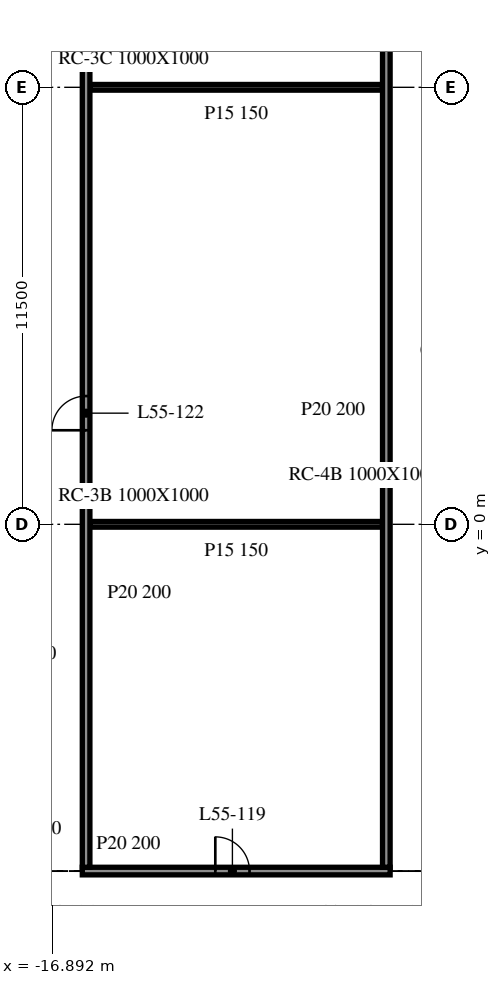
"""IFC4 building model, lengths in metres.
Left out: names, types, materials, properties, quantities, classifications, styles, units other than length and angle.
Written with IfcOpenShell. Run it as: python <this file> out.ifc"""

import sys

from ifc_helpers import new_model, si_unit, direction, frame, frame_2d, origin, place, context, subcontext, project, spatial, rectangle, extrude, element, fill, save


model = new_model("IFC4")
c1 = context("Model", 3, precision=1e-05, world=origin(), true_north=direction((0.0, 1.0)))
c2 = subcontext(c1, "Body", "Model", "MODEL_VIEW")
j1 = project(units=[si_unit("LENGTHUNIT", "METRE"), si_unit("PLANEANGLEUNIT", "RADIAN")], contexts=[c1])
p1 = place(None, origin())
s1 = spatial("IfcSite", under=j1, at=p1, CompositionType="ELEMENT")
p2 = place(p1, origin())
s2 = spatial("IfcBuilding", under=s1, at=p2, CompositionType="ELEMENT")
p3 = place(p2, frame((0.0, 0.0, 228.6)))
s3 = spatial("IfcBuildingStorey", under=s2, at=p3, CompositionType="ELEMENT", Elevation=228.6)
p4 = place(p3, frame((-16.1, -9.125, 0.0), z_axis=(0.0, 0.0, 1.0), x_axis=(1.0, 0.0, 0.0)))
e1 = element("IfcWall", 1, at=p4, inside=s3, PredefinedType="PARTITIONING", context=c2, shape_type="SweptSolid", body=[
    extrude(rectangle(XDim=8.1, YDim=0.2, at=frame_2d((4.05, 0.0))), origin(), (0.0, 0.0, 1.0), 3.46),
])
p5 = place(p4, frame((3.5, 0.0, 0.0)))
e2 = element("IfcOpeningElement", 2, at=p5, cuts=e1, PredefinedType="OPENING", context=c2, shape_type="SweptSolid", body=[
    extrude(rectangle(XDim=0.9, YDim=2.1, at=frame_2d((0.45, 1.05))), frame((0.0, 0.11, 0.0), z_axis=(0.0, -1.0, 0.0), x_axis=(1.0, 0.0, 0.0)), (0.0, 0.0, 1.0), 0.22),
])
for number, where, z_axis, x_axis in (
    (3, (-15.9, 0.0, 0.0), (0.0, 0.0, 1.0), (1.0, 0.0, 0.0)),
    (4, (-15.9, 11.5, 0.0), (0.0, 0.0, 1.0), (1.0, 0.0, 0.0)),
):
    element("IfcWall", number, at=place(p3, frame(where, z_axis=z_axis, x_axis=x_axis)), inside=s3, PredefinedType="PARTITIONING", context=c2, shape_type="SweptSolid", body=[
        extrude(rectangle(XDim=7.7, YDim=0.15, at=frame_2d((3.85, 0.0))), origin(), (0.0, 0.0, 1.0), 3.46),
    ])
p6 = place(p3, frame((-16.0, -9.025, 0.0), z_axis=(0.0, 0.0, 1.0), x_axis=(0.0, 1.0, 0.0)))
e5 = element("IfcWall", 5, at=p6, inside=s3, PredefinedType="PARTITIONING", context=c2, shape_type="SweptSolid", body=[
    extrude(rectangle(XDim=24.05, YDim=0.2, at=frame_2d((12.025, 0.0))), origin(), (0.0, 0.0, 1.0), 3.46),
])
p7 = place(p6, frame((11.5, 0.0, 0.0)))
e6 = element("IfcOpeningElement", 6, at=p7, cuts=e5, PredefinedType="OPENING", context=c2, shape_type="SweptSolid", body=[
    extrude(rectangle(XDim=0.9, YDim=2.1, at=frame_2d((0.45, 1.05))), frame((0.0, 0.11, 0.0), z_axis=(0.0, -1.0, 0.0), x_axis=(1.0, 0.0, 0.0)), (0.0, 0.0, 1.0), 0.22),
])
p8 = place(p3, frame((-8.1, -9.025, 0.0), z_axis=(0.0, 0.0, 1.0), x_axis=(0.0, 1.0, 0.0)))
e7 = element("IfcWall", 7, at=p8, inside=s3, PredefinedType="PARTITIONING", context=c2, shape_type="SweptSolid", body=[
    extrude(rectangle(XDim=24.05, YDim=0.2, at=frame_2d((12.025, 0.0))), origin(), (0.0, 0.0, 1.0), 3.46),
])
p9 = place(p5, origin())
e8 = element("IfcDoor", 8, at=p9, inside=s3, OperationType="SINGLE_SWING_LEFT", PredefinedType="DOOR", context=c2, shape_type="SweptSolid", body=[
    extrude(rectangle(XDim=0.9, YDim=2.1, at=frame_2d((0.45, 1.05))), frame((0.0, 0.025, 0.0), z_axis=(0.0, -1.0, 0.0), x_axis=(1.0, 0.0, 0.0)), (0.0, 0.0, 1.0), 0.05),
])
fill(e2, e8)
p10 = place(p7, origin())
e9 = element("IfcDoor", 9, at=p10, inside=s3, OperationType="SINGLE_SWING_RIGHT", PredefinedType="DOOR", context=c2, shape_type="SweptSolid", body=[
    extrude(rectangle(XDim=0.9, YDim=2.1, at=frame_2d((0.45, 1.05))), frame((0.0, 0.025, 0.0), z_axis=(0.0, -1.0, 0.0), x_axis=(1.0, 0.0, 0.0)), (0.0, 0.0, 1.0), 0.05),
])
fill(e6, e9)
save(model, sys.argv[1])
